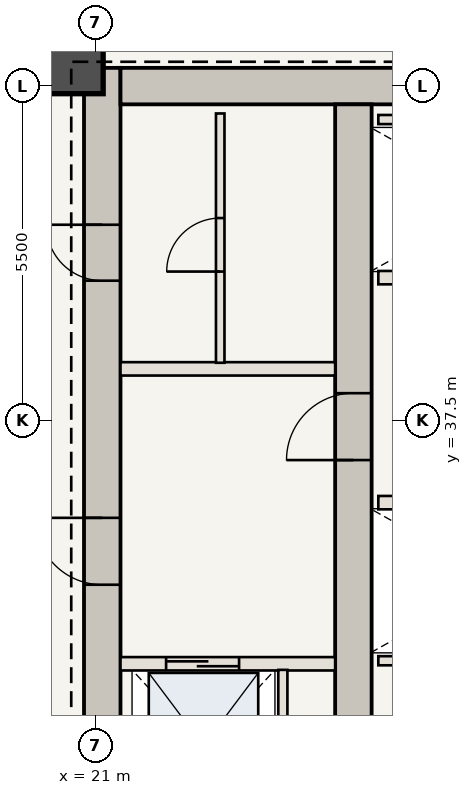
"""IFC4 building model, lengths in metres.
Left out: names, types, materials, properties, quantities, classifications, styles, units other than length and angle.
Written with IfcOpenShell. Run it as: python <this file> out.ifc"""

import sys

from ifc_helpers import new_model, si_unit, direction, frame, frame_2d, origin, origin_2d, place, context, subcontext, project, spatial, rectangle, extrude, element, fill, save


model = new_model("IFC4")
c1 = context("Model", 3, precision=1e-05, world=origin(), true_north=direction((0.0, 1.0)))
c2 = subcontext(c1, "Body", "Model", "MODEL_VIEW")
j1 = project(units=[si_unit("LENGTHUNIT", "METRE"), si_unit("PLANEANGLEUNIT", "RADIAN")], contexts=[c1])
p1 = place(None, origin())
s1 = spatial("IfcSite", under=j1, at=p1, CompositionType="ELEMENT")
p2 = place(p1, origin())
s2 = spatial("IfcBuilding", under=s1, at=p2, CompositionType="ELEMENT")
p3 = place(p2, frame((0.0, 0.0, 129.85)))
s3 = spatial("IfcBuildingStorey", under=s2, at=p3, CompositionType="ELEMENT", Elevation=129.85)
p4 = place(p3, frame((21.11, 30.6, 0.0), z_axis=(0.0, 0.0, 1.0), x_axis=(0.0, 1.0, 0.0)))
e1 = element("IfcWall", 1, at=p4, inside=s3, PredefinedType="SHEAR", context=c2, shape_type="SweptSolid", body=[
    extrude(rectangle(XDim=12.7, YDim=0.6, at=frame_2d((6.35, 0.0))), origin(), (0.0, 0.0, 1.0), 3.85),
])
p5 = place(p4, frame((4.2, 0.0, 0.0)))
e2 = element("IfcOpeningElement", 2, at=p5, cuts=e1, PredefinedType="OPENING", context=c2, shape_type="SweptSolid", body=[
    extrude(rectangle(XDim=1.1, YDim=2.15, at=frame_2d((0.55, 1.075))), frame((0.0, 0.31, 0.0), z_axis=(0.0, -1.0, 0.0), x_axis=(1.0, 0.0, 0.0)), (0.0, 0.0, 1.0), 0.62),
])
p6 = place(p4, frame((9.2, 0.0, 0.0)))
e3 = element("IfcOpeningElement", 3, at=p6, cuts=e1, PredefinedType="OPENING", context=c2, shape_type="SweptSolid", body=[
    extrude(rectangle(XDim=0.92, YDim=2.1, at=frame_2d((0.46, 1.05))), frame((0.0, 0.31, 0.0), z_axis=(0.0, -1.0, 0.0), x_axis=(1.0, 0.0, 0.0)), (0.0, 0.0, 1.0), 0.62),
])
p7 = place(p3, frame((21.41, 43.0, 0.0), z_axis=(0.0, 0.0, 1.0), x_axis=(1.0, 0.0, 0.0)))
e4 = element("IfcWall", 4, at=p7, inside=s3, PredefinedType="SHEAR", context=c2, shape_type="SweptSolid", body=[
    extrude(rectangle(XDim=8.24, YDim=0.6, at=frame_2d((4.12, 0.0))), origin(), (0.0, 0.0, 1.0), 3.85),
])
p8 = place(p3, frame((25.24, 30.6, 0.0), z_axis=(0.0, 0.0, 1.0), x_axis=(0.0, 1.0, 0.0)))
e5 = element("IfcWall", 5, at=p8, inside=s3, PredefinedType="SHEAR", context=c2, shape_type="SweptSolid", body=[
    extrude(rectangle(XDim=12.1, YDim=0.6, at=frame_2d((6.05, 0.0))), origin(), (0.0, 0.0, 1.0), 3.85),
])
p9 = place(p8, frame((6.25, 0.0, 0.0)))
e6 = element("IfcOpeningElement", 6, at=p9, cuts=e5, PredefinedType="OPENING", context=c2, shape_type="SweptSolid", body=[
    extrude(rectangle(XDim=1.1, YDim=2.15, at=frame_2d((0.55, 1.075))), frame((0.0, 0.31, 0.0), z_axis=(0.0, -1.0, 0.0), x_axis=(1.0, 0.0, 0.0)), (0.0, 0.0, 1.0), 0.62),
])
p10 = place(p3, frame((20.65, 43.35, 0.0), z_axis=(0.0, 0.0, 1.0), x_axis=(1.0, 0.0, 0.0)))
e7 = element("IfcColumn", 7, at=p10, inside=s3, PredefinedType="COLUMN", context=c2, shape_type="SweptSolid", body=[
    extrude(rectangle(XDim=0.95, YDim=0.95, at=origin_2d()), origin(), (0.0, 0.0, 1.0), 3.85),
])
p11 = place(p3, frame((21.41, 33.5, 0.0), z_axis=(0.0, 0.0, 1.0), x_axis=(1.0, 0.0, 0.0)))
e8 = element("IfcWall", 8, at=p11, inside=s3, PredefinedType="STANDARD", context=c2, shape_type="SweptSolid", body=[
    extrude(rectangle(XDim=3.53, YDim=0.22, at=frame_2d((1.765, 0.0))), origin(), (0.0, 0.0, 1.0), 3.685),
])
p12 = place(p11, frame((0.75, 0.0, 0.0)))
e9 = element("IfcOpeningElement", 9, at=p12, cuts=e8, PredefinedType="OPENING", context=c2, shape_type="SweptSolid", body=[
    extrude(rectangle(XDim=1.2, YDim=2.2, at=frame_2d((0.6, 1.1))), frame((0.0, 0.12, 0.0), z_axis=(0.0, -1.0, 0.0), x_axis=(1.0, 0.0, 0.0)), (0.0, 0.0, 1.0), 0.24),
])
p13 = place(p3, frame((24.08, 30.75, 0.0), z_axis=(0.0, 0.0, 1.0), x_axis=(0.0, 1.0, 0.0)))
e10 = element("IfcWall", 10, at=p13, inside=s3, PredefinedType="STANDARD", context=c2, shape_type="SweptSolid", body=[
    extrude(rectangle(XDim=2.65, YDim=0.15, at=frame_2d((1.325, 0.0))), origin(), (0.0, 0.0, 1.0), 3.685),
])
p14 = place(p3, frame((21.41, 38.35, 0.0), z_axis=(0.0, 0.0, 1.0), x_axis=(1.0, 0.0, 0.0)))
e11 = element("IfcWall", 11, at=p14, inside=s3, PredefinedType="STANDARD", context=c2, shape_type="SweptSolid", body=[
    extrude(rectangle(XDim=3.53, YDim=0.22, at=frame_2d((1.765, 0.0))), origin(), (0.0, 0.0, 1.0), 3.685),
])
p15 = place(p3, frame((23.05, 38.45, 0.0), z_axis=(0.0, 0.0, 1.0), x_axis=(0.0, 1.0, 0.0)))
e12 = element("IfcWall", 12, at=p15, inside=s3, PredefinedType="STANDARD", context=c2, shape_type="SweptSolid", body=[
    extrude(rectangle(XDim=4.1, YDim=0.14, at=frame_2d((2.05, 0.0))), origin(), (0.0, 0.0, 1.0), 3.685),
])
p16 = place(p15, frame((1.5, 0.0, 0.0)))
e13 = element("IfcOpeningElement", 13, at=p16, cuts=e12, PredefinedType="OPENING", context=c2, shape_type="SweptSolid", body=[
    extrude(rectangle(XDim=0.88, YDim=2.1, at=frame_2d((0.44, 1.05))), frame((0.0, 0.08, 0.0), z_axis=(0.0, -1.0, 0.0), x_axis=(1.0, 0.0, 0.0)), (0.0, 0.0, 1.0), 0.16),
])
p17 = place(p3, frame((25.65, 36.15, 0.0), z_axis=(0.0, 0.0, 1.0), x_axis=(1.0, 0.0, 0.0)))
e14 = element("IfcWall", 14, at=p17, inside=s3, PredefinedType="STANDARD", context=c2, shape_type="SweptSolid", body=[
    extrude(rectangle(XDim=4.3, YDim=0.22, at=frame_2d((2.15, 0.0))), origin(), (0.0, 0.0, 1.0), 3.685),
])
p18 = place(p3, frame((25.65, 33.55, 0.0), z_axis=(0.0, 0.0, 1.0), x_axis=(1.0, 0.0, 0.0)))
e15 = element("IfcWall", 15, at=p18, inside=s3, PredefinedType="STANDARD", context=c2, shape_type="SweptSolid", body=[
    extrude(rectangle(XDim=4.2, YDim=0.15, at=frame_2d((2.1, 0.0))), origin(), (0.0, 0.0, 1.0), 3.685),
])
p19 = place(p3, frame((25.65, 39.85, 0.0), z_axis=(0.0, 0.0, 1.0), x_axis=(1.0, 0.0, 0.0)))
e16 = element("IfcWall", 16, at=p19, inside=s3, PredefinedType="STANDARD", context=c2, shape_type="SweptSolid", body=[
    extrude(rectangle(XDim=4.3, YDim=0.22, at=frame_2d((2.15, 0.0))), origin(), (0.0, 0.0, 1.0), 3.685),
])
p20 = place(p3, frame((25.65, 42.45, 0.0), z_axis=(0.0, 0.0, 1.0), x_axis=(1.0, 0.0, 0.0)))
e17 = element("IfcWall", 17, at=p20, inside=s3, PredefinedType="STANDARD", context=c2, shape_type="SweptSolid", body=[
    extrude(rectangle(XDim=4.2, YDim=0.15, at=frame_2d((2.1, 0.0))), origin(), (0.0, 0.0, 1.0), 3.685),
])
p21 = place(p5, origin())
e18 = element("IfcDoor", 18, at=p21, inside=s3, OperationType="SINGLE_SWING_RIGHT", PredefinedType="DOOR", context=c2, shape_type="SweptSolid", body=[
    extrude(rectangle(XDim=1.1, YDim=2.15, at=frame_2d((0.55, 1.075))), frame((0.0, 0.025, 0.0), z_axis=(0.0, -1.0, 0.0), x_axis=(1.0, 0.0, 0.0)), (0.0, 0.0, 1.0), 0.05),
])
fill(e2, e18)
p22 = place(p9, origin())
e19 = element("IfcDoor", 19, at=p22, inside=s3, OperationType="SINGLE_SWING_LEFT", PredefinedType="DOOR", context=c2, shape_type="SweptSolid", body=[
    extrude(rectangle(XDim=1.1, YDim=2.15, at=frame_2d((0.55, 1.075))), frame((0.0, 0.025, 0.0), z_axis=(0.0, -1.0, 0.0), x_axis=(1.0, 0.0, 0.0)), (0.0, 0.0, 1.0), 0.05),
])
fill(e6, e19)
p23 = place(p6, origin())
e20 = element("IfcDoor", 20, at=p23, inside=s3, OperationType="SINGLE_SWING_RIGHT", PredefinedType="DOOR", context=c2, shape_type="SweptSolid", body=[
    extrude(rectangle(XDim=0.92, YDim=2.1, at=frame_2d((0.46, 1.05))), frame((0.0, 0.025, 0.0), z_axis=(0.0, -1.0, 0.0), x_axis=(1.0, 0.0, 0.0)), (0.0, 0.0, 1.0), 0.05),
])
fill(e3, e20)
p24 = place(p12, origin())
e21 = element("IfcDoor", 21, at=p24, inside=s3, OperationType="DOUBLE_DOOR_SLIDING", PredefinedType="DOOR", context=c2, shape_type="SweptSolid", body=[
    extrude(rectangle(XDim=1.2, YDim=2.2, at=frame_2d((0.6, 1.1))), frame((0.0, 0.025, 0.0), z_axis=(0.0, -1.0, 0.0), x_axis=(1.0, 0.0, 0.0)), (0.0, 0.0, 1.0), 0.05),
])
fill(e9, e21)
p25 = place(p16, origin())
e22 = element("IfcDoor", 22, at=p25, inside=s3, OperationType="SINGLE_SWING_LEFT", PredefinedType="DOOR", context=c2, shape_type="SweptSolid", body=[
    extrude(rectangle(XDim=0.88, YDim=2.1, at=frame_2d((0.44, 1.05))), frame((0.0, 0.025, 0.0), z_axis=(0.0, -1.0, 0.0), x_axis=(1.0, 0.0, 0.0)), (0.0, 0.0, 1.0), 0.05),
])
fill(e13, e22)
save(model, sys.argv[1])
